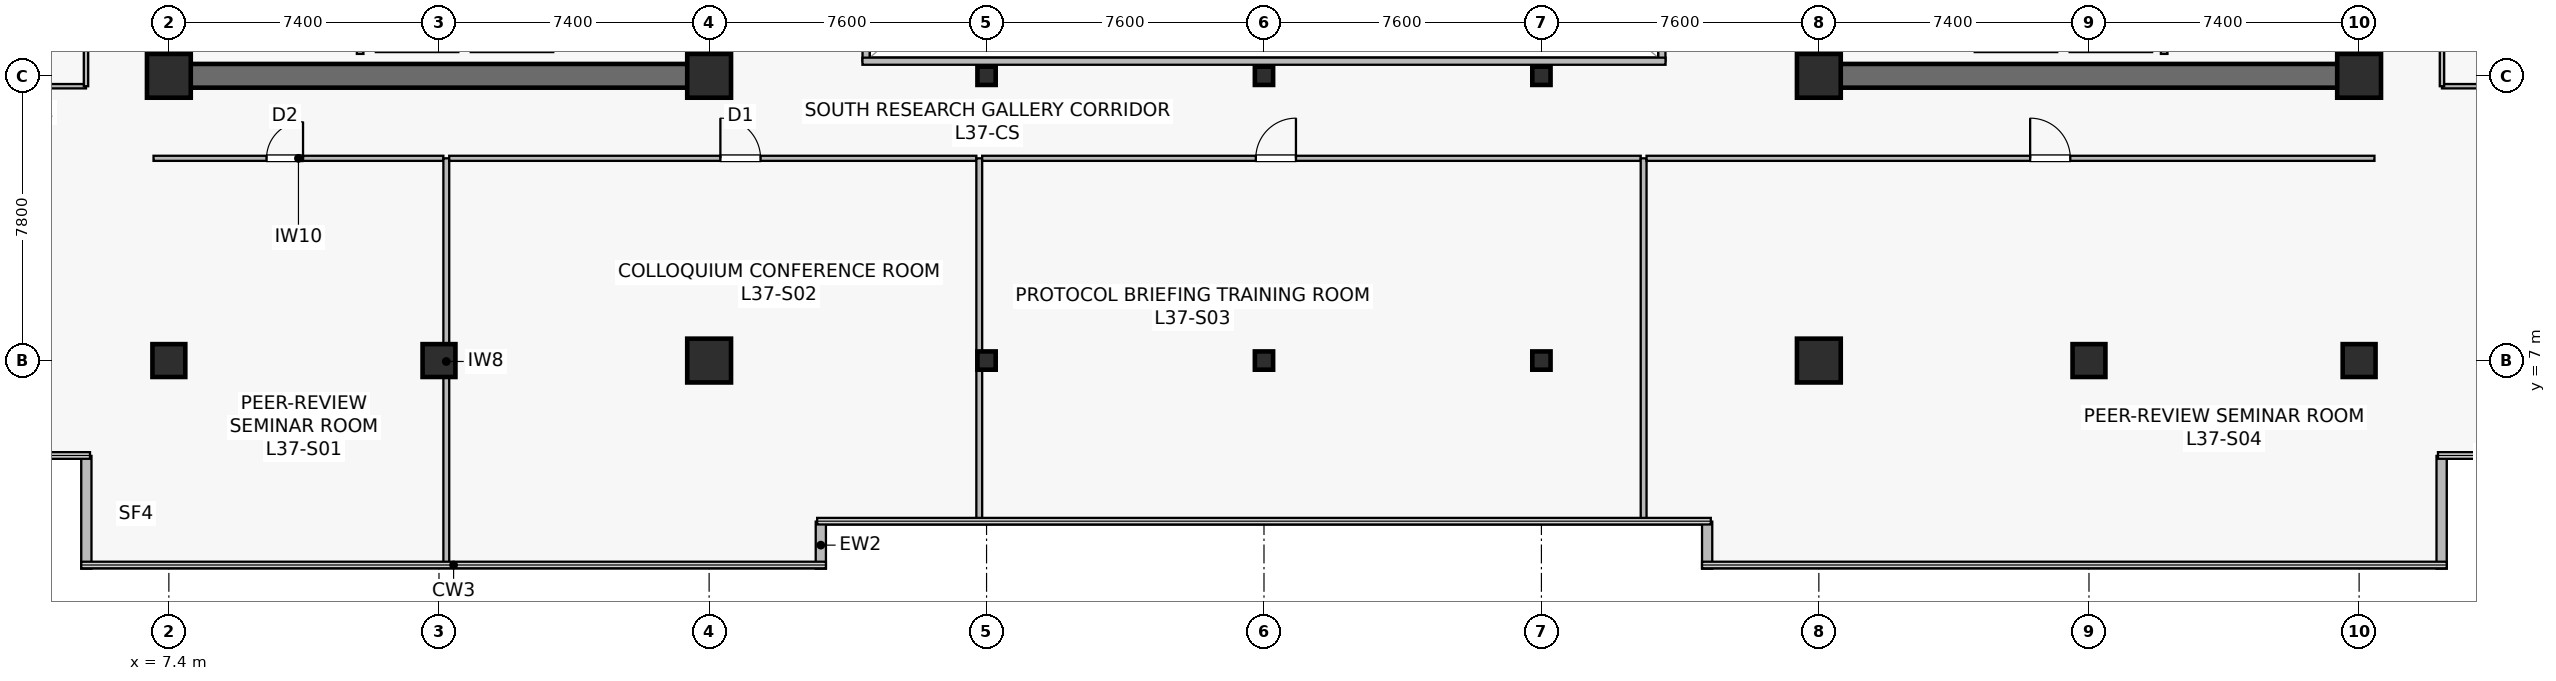
"""IFC4 building model, lengths in metres.
Left out: names, types, materials, properties, quantities, classifications, styles, units other than length and angle.
Written with IfcOpenShell. Run it as: python <this file> out.ifc"""

import sys

from ifc_helpers import new_model, si_unit, direction, frame, frame_2d, origin, origin_2d, place, context, subcontext, project, spatial, rectangle, hollow_rectangle, extrude, source, transform, mapped, element, fill, save


model = new_model("IFC4")
c1 = context("Model", 3, precision=1e-05, world=origin(), true_north=direction((0.0, 1.0)))
c2 = subcontext(c1, "Body", "Model", "MODEL_VIEW")
j1 = project(units=[si_unit("LENGTHUNIT", "METRE"), si_unit("PLANEANGLEUNIT", "RADIAN")], contexts=[c1])
p1 = place(None, origin())
s1 = spatial("IfcSite", under=j1, at=p1, CompositionType="ELEMENT")
p2 = place(p1, origin())
s2 = spatial("IfcBuilding", under=s1, at=p2, CompositionType="ELEMENT")
p3 = place(p2, frame((0.0, 0.0, 154.3)))
s3 = spatial("IfcBuildingStorey", under=s2, at=p3, CompositionType="ELEMENT", Elevation=154.3)
p4 = place(p3, frame((7.075, 14.8, 0.0), z_axis=(0.0, 0.0, 1.0), x_axis=(1.0, 0.0, 0.0)))
e1 = element("IfcWall", 1, at=p4, inside=s3, PredefinedType="SHEAR", context=c2, shape_type="SweptSolid", body=[
    extrude(rectangle(XDim=15.45, YDim=0.65, at=frame_2d((7.725, 0.0))), origin(), (0.0, 0.0, 1.0), 3.79),
])
p5 = place(p3, frame((7.4, 15.125, 0.0), z_axis=(0.0, 0.0, 1.0), x_axis=(0.0, 1.0, 0.0)))
e2 = element("IfcWall", 2, at=p5, inside=s3, PredefinedType="SHEAR", context=c2, shape_type="SweptSolid", body=[
    extrude(rectangle(XDim=18.35, YDim=0.65, at=frame_2d((9.175, 0.0))), origin(), (0.0, 0.0, 1.0), 3.79),
])
p6 = place(p3, frame((22.2, 15.125, 0.0), z_axis=(0.0, 0.0, 1.0), x_axis=(0.0, 1.0, 0.0)))
e3 = element("IfcWall", 3, at=p6, inside=s3, PredefinedType="SHEAR", context=c2, shape_type="SweptSolid", body=[
    extrude(rectangle(XDim=18.35, YDim=0.65, at=frame_2d((9.175, 0.0))), origin(), (0.0, 0.0, 1.0), 3.79),
])
p7 = place(p6, frame((3.425, 0.0, 0.0)))
e4 = element("IfcOpeningElement", 4, at=p7, cuts=e3, PredefinedType="OPENING", context=c2, shape_type="SweptSolid", body=[
    extrude(rectangle(XDim=1.42, YDim=2.2, at=frame_2d((0.71, 1.1))), frame((0.0, 0.335, 0.0), z_axis=(0.0, -1.0, 0.0), x_axis=(1.0, 0.0, 0.0)), (0.0, 0.0, 1.0), 0.67),
])
p8 = place(p3, frame((52.275, 14.8, 0.0), z_axis=(0.0, 0.0, 1.0), x_axis=(1.0, 0.0, 0.0)))
e5 = element("IfcWall", 5, at=p8, inside=s3, PredefinedType="SHEAR", context=c2, shape_type="SweptSolid", body=[
    extrude(rectangle(XDim=15.45, YDim=0.65, at=frame_2d((7.725, 0.0))), origin(), (0.0, 0.0, 1.0), 3.79),
])
p9 = place(p3, frame((52.6, 15.125, 0.0), z_axis=(0.0, 0.0, 1.0), x_axis=(0.0, 1.0, 0.0)))
e6 = element("IfcWall", 6, at=p9, inside=s3, PredefinedType="SHEAR", context=c2, shape_type="SweptSolid", body=[
    extrude(rectangle(XDim=18.35, YDim=0.65, at=frame_2d((9.175, 0.0))), origin(), (0.0, 0.0, 1.0), 3.79),
])
p10 = place(p9, frame((3.425, 0.0, 0.0)))
e7 = element("IfcOpeningElement", 7, at=p10, cuts=e6, PredefinedType="OPENING", context=c2, shape_type="SweptSolid", body=[
    extrude(rectangle(XDim=1.42, YDim=2.2, at=frame_2d((0.71, 1.1))), frame((0.0, 0.335, 0.0), z_axis=(0.0, -1.0, 0.0), x_axis=(1.0, 0.0, 0.0)), (0.0, 0.0, 1.0), 0.67),
])
p11 = place(p3, frame((67.4, 15.125, 0.0), z_axis=(0.0, 0.0, 1.0), x_axis=(0.0, 1.0, 0.0)))
e8 = element("IfcWall", 8, at=p11, inside=s3, PredefinedType="SHEAR", context=c2, shape_type="SweptSolid", body=[
    extrude(rectangle(XDim=18.35, YDim=0.65, at=frame_2d((9.175, 0.0))), origin(), (0.0, 0.0, 1.0), 3.79),
])
m1 = source(origin(), c2, "Body", "SweptSolid", [
    extrude(rectangle(XDim=0.9, YDim=0.9, at=origin_2d()), origin(), (0.0, 0.0, 1.0), 4.1),
])
p12 = place(p3, frame((14.8, 7.0, 0.0), z_axis=(0.0, 0.0, 1.0), x_axis=(1.0, 0.0, 0.0)))
e9 = element("IfcColumn", 9, at=p12, inside=s3, PredefinedType="COLUMN", context=c2, shape_type="MappedRepresentation", body=[
    mapped(m1, transform((0.0, 0.0, 0.0), scale=1.0)),
])
m2 = source(origin(), c2, "Body", "SweptSolid", [
    extrude(rectangle(XDim=1.2, YDim=1.2, at=origin_2d()), origin(), (0.0, 0.0, 1.0), 4.1),
])
for number, where, z_axis, x_axis in (
    (10, (22.2, 7.0, 0.0), (0.0, 0.0, 1.0), (1.0, 0.0, 0.0)),
    (11, (7.4, 14.8, 0.0), (0.0, 0.0, 1.0), (1.0, 0.0, 0.0)),
    (12, (22.2, 14.8, 0.0), (0.0, 0.0, 1.0), (1.0, 0.0, 0.0)),
    (13, (52.6, 7.0, 0.0), (0.0, 0.0, 1.0), (1.0, 0.0, 0.0)),
):
    element("IfcColumn", number, at=place(p3, frame(where, z_axis=z_axis, x_axis=x_axis)), inside=s3, PredefinedType="COLUMN", context=c2, shape_type="MappedRepresentation", body=[
        mapped(m2, transform((0.0, 0.0, 0.0), scale=1.0)),
    ])
p13 = place(p3, frame((60.0, 7.0, 0.0), z_axis=(0.0, 0.0, 1.0), x_axis=(1.0, 0.0, 0.0)))
e14 = element("IfcColumn", 14, at=p13, inside=s3, PredefinedType="COLUMN", context=c2, shape_type="MappedRepresentation", body=[
    mapped(m1, transform((0.0, 0.0, 0.0), scale=1.0)),
])
for number, where, z_axis, x_axis in (
    (15, (52.6, 14.8, 0.0), (0.0, 0.0, 1.0), (1.0, 0.0, 0.0)),
    (16, (67.4, 14.8, 0.0), (0.0, 0.0, 1.0), (1.0, 0.0, 0.0)),
):
    element("IfcColumn", number, at=place(p3, frame(where, z_axis=z_axis, x_axis=x_axis)), inside=s3, PredefinedType="COLUMN", context=c2, shape_type="MappedRepresentation", body=[
        mapped(m2, transform((0.0, 0.0, 0.0), scale=1.0)),
    ])
for number, where, z_axis, x_axis in (
    (17, (7.4, 7.0, 0.0), (0.0, 0.0, 1.0), (1.0, 0.0, 0.0)),
    (18, (67.4, 7.0, 0.0), (0.0, 0.0, 1.0), (1.0, 0.0, 0.0)),
):
    element("IfcColumn", number, at=place(p3, frame(where, z_axis=z_axis, x_axis=x_axis)), inside=s3, PredefinedType="COLUMN", context=c2, shape_type="MappedRepresentation", body=[
        mapped(m1, transform((0.0, 0.0, 0.0), scale=1.0)),
    ])
m3 = source(origin(), c2, "Body", "SweptSolid", [
    extrude(hollow_rectangle(XDim=0.5, YDim=0.5, WallThickness=0.022, at=origin_2d()), origin(), (0.0, 0.0, 1.0), 4.1),
])
for number, where, z_axis, x_axis in (
    (19, (29.8, 7.0, 0.0), (0.0, 0.0, 1.0), (1.0, 0.0, 0.0)),
    (20, (29.8, 14.8, 0.0), (0.0, 0.0, 1.0), (1.0, 0.0, 0.0)),
    (21, (37.4, 7.0, 0.0), (0.0, 0.0, 1.0), (1.0, 0.0, 0.0)),
    (22, (37.4, 14.8, 0.0), (0.0, 0.0, 1.0), (1.0, 0.0, 0.0)),
    (23, (45.0, 7.0, 0.0), (0.0, 0.0, 1.0), (1.0, 0.0, 0.0)),
    (24, (45.0, 14.8, 0.0), (0.0, 0.0, 1.0), (1.0, 0.0, 0.0)),
):
    element("IfcColumn", number, at=place(p3, frame(where, z_axis=z_axis, x_axis=x_axis)), inside=s3, PredefinedType="COLUMN", context=c2, shape_type="MappedRepresentation", body=[
        mapped(m3, transform((0.0, 0.0, 0.0), scale=1.0)),
    ])
for number, where, z_axis, x_axis in (
    (25, (25.26, 1.3, 0.0), (0.0, 0.0, 1.0), (0.0, 1.0, 0.0)),
    (26, (49.54, 2.588, 0.0), (0.0, 0.0, 1.0), (0.0, -1.0, 0.0)),
):
    element("IfcWall", number, at=place(p3, frame(where, z_axis=z_axis, x_axis=x_axis)), inside=s3, PredefinedType="STANDARD", context=c2, shape_type="SweptSolid", body=[
        extrude(rectangle(XDim=1.288, YDim=0.28, at=frame_2d((0.644, 0.0))), origin(), (0.0, 0.0, 1.0), 3.79),
    ])
for number, where, z_axis, x_axis in (
    (27, (69.66, 1.3, 0.0), (0.0, 0.0, 1.0), (0.0, 1.0, 0.0)),
    (28, (5.14, 4.388, 0.0), (0.0, 0.0, 1.0), (0.0, -1.0, 0.0)),
):
    element("IfcWall", number, at=place(p3, frame(where, z_axis=z_axis, x_axis=x_axis)), inside=s3, PredefinedType="STANDARD", context=c2, shape_type="SweptSolid", body=[
        extrude(rectangle(XDim=3.088, YDim=0.28, at=frame_2d((1.544, 0.0))), origin(), (0.0, 0.0, 1.0), 3.79),
    ])
p14 = place(p3, frame((13.07, 15.55, 0.0), z_axis=(0.0, 0.0, 1.0), x_axis=(1.0, 0.0, 0.0)))
e29 = element("IfcWall", 29, at=p14, inside=s3, PredefinedType="SOLIDWALL", context=c2, shape_type="SweptSolid", body=[
    extrude(rectangle(XDim=2.26, YDim=0.2, at=frame_2d((1.13, 0.0))), origin(), (0.0, 0.0, 1.0), 3.187),
])
p15 = place(p3, frame((15.67, 15.55, 0.0), z_axis=(0.0, 0.0, 1.0), x_axis=(1.0, 0.0, 0.0)))
e30 = element("IfcWall", 30, at=p15, inside=s3, PredefinedType="SOLIDWALL", context=c2, shape_type="SweptSolid", body=[
    extrude(rectangle(XDim=2.26, YDim=0.2, at=frame_2d((1.13, 0.0))), origin(), (0.0, 0.0, 1.0), 3.79),
])
p16 = place(p3, frame((12.64, 15.4, 0.0), z_axis=(0.0, 0.0, 1.0), x_axis=(0.0, 1.0, 0.0)))
e31 = element("IfcWall", 31, at=p16, inside=s3, PredefinedType="SOLIDWALL", context=c2, shape_type="SweptSolid", body=[
    extrude(rectangle(XDim=2.4, YDim=0.18, at=frame_2d((1.2, 0.0))), origin(), (0.0, 0.0, 1.0), 3.79),
])
p17 = place(p3, frame((59.47, 15.55, 0.0), z_axis=(0.0, 0.0, 1.0), x_axis=(1.0, 0.0, 0.0)))
e32 = element("IfcWall", 32, at=p17, inside=s3, PredefinedType="SOLIDWALL", context=c2, shape_type="SweptSolid", body=[
    extrude(rectangle(XDim=2.26, YDim=0.2, at=frame_2d((1.13, 0.0))), origin(), (0.0, 0.0, 1.0), 3.187),
])
p18 = place(p3, frame((56.87, 15.55, 0.0), z_axis=(0.0, 0.0, 1.0), x_axis=(1.0, 0.0, 0.0)))
e33 = element("IfcWall", 33, at=p18, inside=s3, PredefinedType="SOLIDWALL", context=c2, shape_type="SweptSolid", body=[
    extrude(rectangle(XDim=2.26, YDim=0.2, at=frame_2d((1.13, 0.0))), origin(), (0.0, 0.0, 1.0), 3.79),
])
p19 = place(p3, frame((62.06, 15.4, 0.0), z_axis=(0.0, 0.0, 1.0), x_axis=(0.0, 1.0, 0.0)))
e34 = element("IfcWall", 34, at=p19, inside=s3, PredefinedType="SOLIDWALL", context=c2, shape_type="SweptSolid", body=[
    extrude(rectangle(XDim=2.4, YDim=0.18, at=frame_2d((1.2, 0.0))), origin(), (0.0, 0.0, 1.0), 3.79),
])
p20 = place(p3, frame((26.5, 15.2, 0.0), z_axis=(0.0, 0.0, 1.0), x_axis=(0.0, 1.0, 0.0)))
e35 = element("IfcWall", 35, at=p20, inside=s3, PredefinedType="SOLIDWALL", context=c2, shape_type="SweptSolid", body=[
    extrude(rectangle(XDim=18.2, YDim=0.195, at=frame_2d((9.1, 0.0))), origin(), (0.0, 0.0, 1.0), 3.79),
])
p21 = place(p20, frame((1.8, 0.0, 0.9)))
e36 = element("IfcOpeningElement", 36, at=p21, cuts=e35, PredefinedType="OPENING", context=c2, shape_type="SweptSolid", body=[
    extrude(rectangle(XDim=1.2, YDim=1.35, at=frame_2d((0.6, 0.675))), frame((0.0, 0.107, 0.0), z_axis=(0.0, -1.0, 0.0), x_axis=(1.0, 0.0, 0.0)), (0.0, 0.0, 1.0), 0.215),
])
p22 = place(p20, frame((13.2, 0.0, 0.9)))
e37 = element("IfcOpeningElement", 37, at=p22, cuts=e35, PredefinedType="OPENING", context=c2, shape_type="SweptSolid", body=[
    extrude(rectangle(XDim=1.2, YDim=1.35, at=frame_2d((0.6, 0.675))), frame((0.0, 0.107, 0.0), z_axis=(0.0, -1.0, 0.0), x_axis=(1.0, 0.0, 0.0)), (0.0, 0.0, 1.0), 0.215),
])
p23 = place(p3, frame((48.3, 15.2, 0.0), z_axis=(0.0, 0.0, 1.0), x_axis=(0.0, 1.0, 0.0)))
e38 = element("IfcWall", 38, at=p23, inside=s3, PredefinedType="SOLIDWALL", context=c2, shape_type="SweptSolid", body=[
    extrude(rectangle(XDim=18.2, YDim=0.195, at=frame_2d((9.1, 0.0))), origin(), (0.0, 0.0, 1.0), 3.79),
])
p24 = place(p23, frame((1.8, 0.0, 0.9)))
e39 = element("IfcOpeningElement", 39, at=p24, cuts=e38, PredefinedType="OPENING", context=c2, shape_type="SweptSolid", body=[
    extrude(rectangle(XDim=1.2, YDim=1.35, at=frame_2d((0.6, 0.675))), frame((0.0, 0.107, 0.0), z_axis=(0.0, -1.0, 0.0), x_axis=(1.0, 0.0, 0.0)), (0.0, 0.0, 1.0), 0.215),
])
p25 = place(p23, frame((13.2, 0.0, 0.9)))
e40 = element("IfcOpeningElement", 40, at=p25, cuts=e38, PredefinedType="OPENING", context=c2, shape_type="SweptSolid", body=[
    extrude(rectangle(XDim=1.2, YDim=1.35, at=frame_2d((0.6, 0.675))), frame((0.0, 0.107, 0.0), z_axis=(0.0, -1.0, 0.0), x_axis=(1.0, 0.0, 0.0)), (0.0, 0.0, 1.0), 0.215),
])
p26 = place(p3, frame((26.4, 15.2, 0.0), z_axis=(0.0, 0.0, 1.0), x_axis=(1.0, 0.0, 0.0)))
e41 = element("IfcWall", 41, at=p26, inside=s3, PredefinedType="SOLIDWALL", context=c2, shape_type="SweptSolid", body=[
    extrude(rectangle(XDim=22.0, YDim=0.195, at=frame_2d((11.0, 0.0))), origin(), (0.0, 0.0, 1.0), 3.79),
])
p27 = place(p3, frame((6.98, 12.54, 0.0), z_axis=(0.0, 0.0, 1.0), x_axis=(1.0, 0.0, 0.0)))
e42 = element("IfcWall", 42, at=p27, inside=s3, PredefinedType="PARTITIONING", context=c2, shape_type="SweptSolid", body=[
    extrude(rectangle(XDim=7.94, YDim=0.14, at=frame_2d((3.97, 0.0))), origin(), (0.0, 0.0, 1.0), 3.187),
])
p28 = place(p27, frame((3.096, 0.0, 0.0)))
e43 = element("IfcOpeningElement", 43, at=p28, cuts=e42, PredefinedType="OPENING", context=c2, shape_type="SweptSolid", body=[
    extrude(rectangle(XDim=1.0, YDim=2.15, at=frame_2d((0.5, 1.075))), frame((0.0, 0.08, 0.0), z_axis=(0.0, -1.0, 0.0), x_axis=(1.0, 0.0, 0.0)), (0.0, 0.0, 1.0), 0.16),
])
p29 = place(p3, frame((15.0, 1.41, 0.0), z_axis=(0.0, 0.0, 1.0), x_axis=(0.0, 1.0, 0.0)))
e44 = element("IfcWall", 44, at=p29, inside=s3, PredefinedType="PARTITIONING", context=c2, shape_type="SweptSolid", body=[
    extrude(rectangle(XDim=11.13, YDim=0.16, at=frame_2d((5.565, 0.0))), origin(), (0.0, 0.0, 1.0), 3.075),
])
p30 = place(p3, frame((15.08, 12.54, 0.0), z_axis=(0.0, 0.0, 1.0), x_axis=(1.0, 0.0, 0.0)))
e45 = element("IfcWall", 45, at=p30, inside=s3, PredefinedType="PARTITIONING", context=c2, shape_type="SweptSolid", body=[
    extrude(rectangle(XDim=14.44, YDim=0.14, at=frame_2d((7.22, 0.0))), origin(), (0.0, 0.0, 1.0), 3.187),
])
p31 = place(p30, frame((7.428, 0.0, 0.0)))
e46 = element("IfcOpeningElement", 46, at=p31, cuts=e45, PredefinedType="OPENING", context=c2, shape_type="SweptSolid", body=[
    extrude(rectangle(XDim=1.1, YDim=2.18, at=frame_2d((0.55, 1.09))), frame((0.0, 0.08, 0.0), z_axis=(0.0, -1.0, 0.0), x_axis=(1.0, 0.0, 0.0)), (0.0, 0.0, 1.0), 0.16),
])
p32 = place(p3, frame((29.6, 2.61, 0.0), z_axis=(0.0, 0.0, 1.0), x_axis=(0.0, 1.0, 0.0)))
e47 = element("IfcWall", 47, at=p32, inside=s3, PredefinedType="PARTITIONING", context=c2, shape_type="SweptSolid", body=[
    extrude(rectangle(XDim=9.93, YDim=0.16, at=frame_2d((4.965, 0.0))), origin(), (0.0, 0.0, 1.0), 3.075),
])
p33 = place(p3, frame((29.68, 12.54, 0.0), z_axis=(0.0, 0.0, 1.0), x_axis=(1.0, 0.0, 0.0)))
e48 = element("IfcWall", 48, at=p33, inside=s3, PredefinedType="PARTITIONING", context=c2, shape_type="SweptSolid", body=[
    extrude(rectangle(XDim=18.04, YDim=0.14, at=frame_2d((9.02, 0.0))), origin(), (0.0, 0.0, 1.0), 3.187),
])
p34 = place(p33, frame((7.496, 0.0, 0.0)))
e49 = element("IfcOpeningElement", 49, at=p34, cuts=e48, PredefinedType="OPENING", context=c2, shape_type="SweptSolid", body=[
    extrude(rectangle(XDim=1.1, YDim=2.18, at=frame_2d((0.55, 1.09))), frame((0.0, 0.08, 0.0), z_axis=(0.0, -1.0, 0.0), x_axis=(1.0, 0.0, 0.0)), (0.0, 0.0, 1.0), 0.16),
])
p35 = place(p3, frame((47.8, 2.61, 0.0), z_axis=(0.0, 0.0, 1.0), x_axis=(0.0, 1.0, 0.0)))
e50 = element("IfcWall", 50, at=p35, inside=s3, PredefinedType="PARTITIONING", context=c2, shape_type="SweptSolid", body=[
    extrude(rectangle(XDim=9.93, YDim=0.16, at=frame_2d((4.965, 0.0))), origin(), (0.0, 0.0, 1.0), 3.075),
])
p36 = place(p3, frame((47.88, 12.54, 0.0), z_axis=(0.0, 0.0, 1.0), x_axis=(1.0, 0.0, 0.0)))
e51 = element("IfcWall", 51, at=p36, inside=s3, PredefinedType="PARTITIONING", context=c2, shape_type="SweptSolid", body=[
    extrude(rectangle(XDim=19.94, YDim=0.14, at=frame_2d((9.97, 0.0))), origin(), (0.0, 0.0, 1.0), 3.187),
])
p37 = place(p36, frame((10.508, 0.0, 0.0)))
e52 = element("IfcOpeningElement", 52, at=p37, cuts=e51, PredefinedType="OPENING", context=c2, shape_type="SweptSolid", body=[
    extrude(rectangle(XDim=1.1, YDim=2.18, at=frame_2d((0.55, 1.09))), frame((0.0, 0.08, 0.0), z_axis=(0.0, -1.0, 0.0), x_axis=(1.0, 0.0, 0.0)), (0.0, 0.0, 1.0), 0.16),
])
p38 = place(p3, frame((2.11, 14.515, 0.0), z_axis=(0.0, 0.0, 1.0), x_axis=(1.0, 0.0, 0.0)))
e53 = element("IfcWall", 53, at=p38, inside=s3, PredefinedType="PARTITIONING", context=c2, shape_type="SweptSolid", body=[
    extrude(rectangle(XDim=3.02, YDim=0.12, at=frame_2d((1.51, 0.0))), origin(), (0.0, 0.0, 1.0), 3.79),
])
p39 = place(p3, frame((5.13, 14.515, 0.0), z_axis=(0.0, 0.0, 1.0), x_axis=(0.0, 1.0, 0.0)))
e54 = element("IfcWall", 54, at=p39, inside=s3, PredefinedType="PARTITIONING", context=c2, shape_type="SweptSolid", body=[
    extrude(rectangle(XDim=4.425, YDim=0.12, at=frame_2d((2.212, 0.0))), origin(), (0.0, 0.0, 1.0), 3.79),
])
p40 = place(p39, frame((1.762, 0.0, 0.0)))
e55 = element("IfcOpeningElement", 55, at=p40, cuts=e54, PredefinedType="OPENING", context=c2, shape_type="SweptSolid", body=[
    extrude(rectangle(XDim=0.9, YDim=2.1, at=frame_2d((0.45, 1.05))), frame((0.0, 0.07, 0.0), z_axis=(0.0, -1.0, 0.0), x_axis=(1.0, 0.0, 0.0)), (0.0, 0.0, 1.0), 0.14),
])
p41 = place(p3, frame((69.67, 14.515, 0.0), z_axis=(0.0, 0.0, 1.0), x_axis=(1.0, 0.0, 0.0)))
e56 = element("IfcWall", 56, at=p41, inside=s3, PredefinedType="PARTITIONING", context=c2, shape_type="SweptSolid", body=[
    extrude(rectangle(XDim=3.02, YDim=0.12, at=frame_2d((1.51, 0.0))), origin(), (0.0, 0.0, 1.0), 3.79),
])
p42 = place(p3, frame((69.67, 14.515, 0.0), z_axis=(0.0, 0.0, 1.0), x_axis=(0.0, 1.0, 0.0)))
e57 = element("IfcWall", 57, at=p42, inside=s3, PredefinedType="PARTITIONING", context=c2, shape_type="SweptSolid", body=[
    extrude(rectangle(XDim=6.825, YDim=0.12, at=frame_2d((3.413, 0.0))), origin(), (0.0, 0.0, 1.0), 3.79),
])
p43 = place(p42, frame((2.962, 0.0, 0.0)))
e58 = element("IfcOpeningElement", 58, at=p43, cuts=e57, PredefinedType="OPENING", context=c2, shape_type="SweptSolid", body=[
    extrude(rectangle(XDim=0.9, YDim=2.1, at=frame_2d((0.45, 1.05))), frame((0.0, 0.07, 0.0), z_axis=(0.0, -1.0, 0.0), x_axis=(1.0, 0.0, 0.0)), (0.0, 0.0, 1.0), 0.14),
])
m4 = source(origin(), c2, "Body", "SweptSolid", [
    extrude(rectangle(XDim=1.0, YDim=2.15, at=frame_2d((0.5, 1.075))), frame((0.0, 0.025, 0.0), z_axis=(0.0, -1.0, 0.0), x_axis=(1.0, 0.0, 0.0)), (0.0, 0.0, 1.0), 0.05),
])
p44 = place(p28, origin())
e59 = element("IfcDoor", 59, at=p44, inside=s3, OperationType="SINGLE_SWING_RIGHT", PredefinedType="DOOR", context=c2, shape_type="MappedRepresentation", body=[
    mapped(m4, transform((0.0, 0.0, 0.0), scale=1.0)),
])
fill(e43, e59)
m5 = source(origin(), c2, "Body", "SweptSolid", [
    extrude(rectangle(XDim=1.1, YDim=2.18, at=frame_2d((0.55, 1.09))), frame((0.0, 0.025, 0.0), z_axis=(0.0, -1.0, 0.0), x_axis=(1.0, 0.0, 0.0)), (0.0, 0.0, 1.0), 0.05),
])
p45 = place(p31, origin())
e60 = element("IfcDoor", 60, at=p45, inside=s3, OperationType="SINGLE_SWING_LEFT", PredefinedType="DOOR", context=c2, shape_type="MappedRepresentation", body=[
    mapped(m5, transform((0.0, 0.0, 0.0), scale=1.0)),
])
fill(e46, e60)
p46 = place(p34, origin())
e61 = element("IfcDoor", 61, at=p46, inside=s3, OperationType="SINGLE_SWING_RIGHT", PredefinedType="DOOR", context=c2, shape_type="MappedRepresentation", body=[
    mapped(m5, transform((0.0, 0.0, 0.0), scale=1.0)),
])
fill(e49, e61)
p47 = place(p37, origin())
e62 = element("IfcDoor", 62, at=p47, inside=s3, OperationType="SINGLE_SWING_LEFT", PredefinedType="DOOR", context=c2, shape_type="MappedRepresentation", body=[
    mapped(m5, transform((0.0, 0.0, 0.0), scale=1.0)),
])
fill(e52, e62)
save(model, sys.argv[1])
